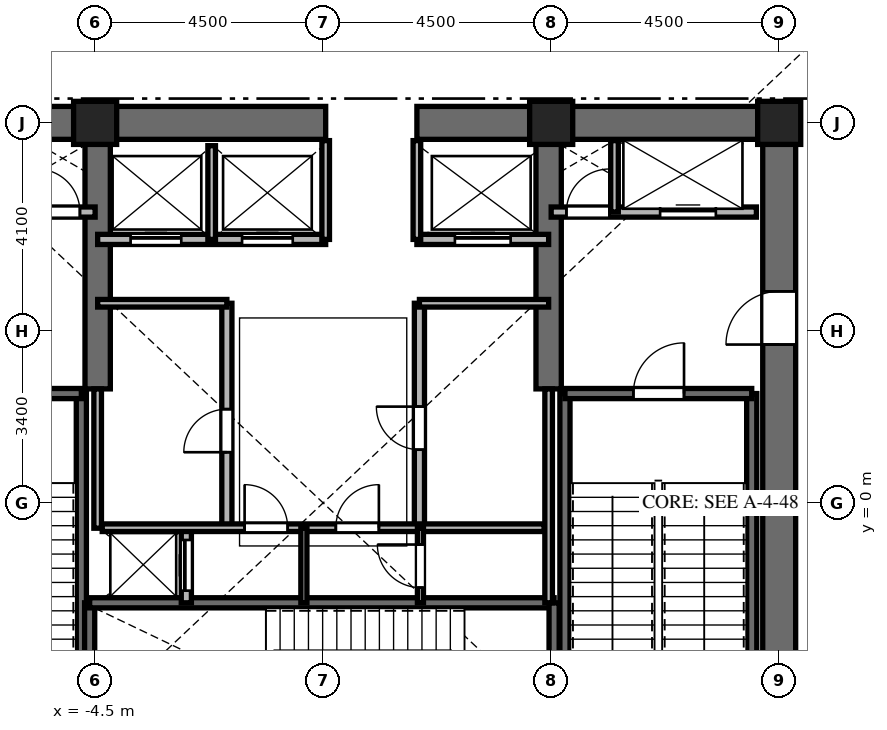
"""IFC4 building model, lengths in metres.
Left out: names, types, materials, properties, quantities, classifications, styles, units other than length and angle.
Written with IfcOpenShell. Run it as: python <this file> out.ifc"""

import sys

from ifc_helpers import new_model, si_unit, direction, frame, frame_2d, origin, origin_2d, place, context, subcontext, project, spatial, rectangle, extrude, element, fill, save


model = new_model("IFC4")
c1 = context("Model", 3, precision=1e-05, world=origin(), true_north=direction((0.0, 1.0)))
c2 = subcontext(c1, "Body", "Model", "MODEL_VIEW")
j1 = project(units=[si_unit("LENGTHUNIT", "METRE"), si_unit("PLANEANGLEUNIT", "RADIAN")], contexts=[c1])
p1 = place(None, origin())
s1 = spatial("IfcSite", under=j1, at=p1, CompositionType="ELEMENT")
p2 = place(p1, origin())
s2 = spatial("IfcBuilding", under=s1, at=p2, CompositionType="ELEMENT")
p3 = place(p2, frame((0.0, 0.0, 305.4)))
s3 = spatial("IfcBuildingStorey", under=s2, at=p3, CompositionType="ELEMENT", Elevation=305.4)
p4 = place(p3, frame((-9.325, 7.5, 0.0), z_axis=(0.0, 0.0, 1.0), x_axis=(1.0, 0.0, 0.0)))
e1 = element("IfcWall", 1, at=p4, inside=s3, PredefinedType="SHEAR", context=c2, shape_type="SweptSolid", body=[
    extrude(rectangle(XDim=9.375, YDim=0.65, at=frame_2d((4.688, 0.0))), origin(), (0.0, 0.0, 1.0), 5.0),
])
p5 = place(p3, frame((1.85, 7.5, 0.0), z_axis=(0.0, 0.0, 1.0), x_axis=(1.0, 0.0, 0.0)))
e2 = element("IfcWall", 2, at=p5, inside=s3, PredefinedType="SHEAR", context=c2, shape_type="SweptSolid", body=[
    extrude(rectangle(XDim=7.475, YDim=0.65, at=frame_2d((3.737, 0.0))), origin(), (0.0, 0.0, 1.0), 5.0),
])
p6 = place(p3, frame((9.0, -7.175, 0.0), z_axis=(0.0, 0.0, 1.0), x_axis=(0.0, 1.0, 0.0)))
e3 = element("IfcWall", 3, at=p6, inside=s3, PredefinedType="SHEAR", context=c2, shape_type="SweptSolid", body=[
    extrude(rectangle(XDim=14.35, YDim=0.65, at=frame_2d((7.175, 0.0))), origin(), (0.0, 0.0, 1.0), 5.0),
])
p7 = place(p6, frame((10.3, 0.0, 0.0)))
e4 = element("IfcOpeningElement", 4, at=p7, cuts=e3, PredefinedType="OPENING", context=c2, shape_type="SweptSolid", body=[
    extrude(rectangle(XDim=1.05, YDim=2.15, at=frame_2d((0.525, 1.075))), frame((0.0, 0.335, 0.0), z_axis=(0.0, -1.0, 0.0), x_axis=(1.0, 0.0, 0.0)), (0.0, 0.0, 1.0), 0.67),
])
for number, where, z_axis, x_axis in (
    (5, (-4.45, 2.25, 0.0), (0.0, 0.0, 1.0), (0.0, 1.0, 0.0)),
    (6, (4.45, 2.25, 0.0), (0.0, 0.0, 1.0), (0.0, 1.0, 0.0)),
):
    element("IfcWall", number, at=place(p3, frame(where, z_axis=z_axis, x_axis=x_axis)), inside=s3, PredefinedType="SHEAR", context=c2, shape_type="SweptSolid", body=[
        extrude(rectangle(XDim=4.925, YDim=0.5, at=frame_2d((2.462, 0.0))), origin(), (0.0, 0.0, 1.0), 5.0),
    ])
p8 = place(p3, frame((-4.772, -6.985, 0.0), z_axis=(0.0, 0.0, 1.0), x_axis=(0.0, 1.0, 0.0)))
e7 = element("IfcWall", 7, at=p8, inside=s3, PredefinedType="SHEAR", context=c2, shape_type="SweptSolid", body=[
    extrude(rectangle(XDim=9.143, YDim=0.2, at=frame_2d((4.572, 0.0))), origin(), (0.0, 0.0, 1.0), 5.0),
])
p9 = place(p3, frame((-8.458, 2.158, 0.0), z_axis=(0.0, 0.0, 1.0), x_axis=(1.0, 0.0, 0.0)))
e8 = element("IfcWall", 8, at=p9, inside=s3, PredefinedType="SHEAR", context=c2, shape_type="SweptSolid", body=[
    extrude(rectangle(XDim=3.686, YDim=0.2, at=frame_2d((1.843, 0.0))), origin(), (0.0, 0.0, 1.0), 5.0),
])
p10 = place(p9, frame((1.3, 0.0, 0.0)))
e9 = element("IfcOpeningElement", 9, at=p10, cuts=e8, PredefinedType="OPENING", context=c2, shape_type="SweptSolid", body=[
    extrude(rectangle(XDim=1.0, YDim=2.15, at=frame_2d((0.5, 1.075))), frame((0.0, 0.11, 0.0), z_axis=(0.0, -1.0, 0.0), x_axis=(1.0, 0.0, 0.0)), (0.0, 0.0, 1.0), 0.22),
])
for number, where, z_axis, x_axis in (
    (10, (4.772, -6.985, 0.0), (0.0, 0.0, 1.0), (0.0, 1.0, 0.0)),
    (11, (8.458, -6.985, 0.0), (0.0, 0.0, 1.0), (0.0, 1.0, 0.0)),
):
    element("IfcWall", number, at=place(p3, frame(where, z_axis=z_axis, x_axis=x_axis)), inside=s3, PredefinedType="SHEAR", context=c2, shape_type="SweptSolid", body=[
        extrude(rectangle(XDim=9.143, YDim=0.2, at=frame_2d((4.572, 0.0))), origin(), (0.0, 0.0, 1.0), 5.0),
    ])
p11 = place(p3, frame((4.772, 2.158, 0.0), z_axis=(0.0, 0.0, 1.0), x_axis=(1.0, 0.0, 0.0)))
e12 = element("IfcWall", 12, at=p11, inside=s3, PredefinedType="SHEAR", context=c2, shape_type="SweptSolid", body=[
    extrude(rectangle(XDim=3.686, YDim=0.2, at=frame_2d((1.843, 0.0))), origin(), (0.0, 0.0, 1.0), 5.0),
])
p12 = place(p11, frame((1.35, 0.0, 0.0)))
e13 = element("IfcOpeningElement", 13, at=p12, cuts=e12, PredefinedType="OPENING", context=c2, shape_type="SweptSolid", body=[
    extrude(rectangle(XDim=1.0, YDim=2.15, at=frame_2d((0.5, 1.075))), frame((0.0, 0.11, 0.0), z_axis=(0.0, -1.0, 0.0), x_axis=(1.0, 0.0, 0.0)), (0.0, 0.0, 1.0), 0.22),
])
p13 = place(p3, frame((-4.608, -5.658, 0.0), z_axis=(0.0, 0.0, 1.0), x_axis=(0.0, 1.0, 0.0)))
e14 = element("IfcWall", 14, at=p13, inside=s3, PredefinedType="SHEAR", context=c2, shape_type="SweptSolid", body=[
    extrude(rectangle(XDim=3.686, YDim=0.2, at=frame_2d((1.843, 0.0))), origin(), (0.0, 0.0, 1.0), 5.0),
])
p14 = place(p3, frame((-4.608, -1.972, 0.0), z_axis=(0.0, 0.0, 1.0), x_axis=(1.0, 0.0, 0.0)))
e15 = element("IfcWall", 15, at=p14, inside=s3, PredefinedType="SHEAR", context=c2, shape_type="SweptSolid", body=[
    extrude(rectangle(XDim=9.166, YDim=0.2, at=frame_2d((4.583, 0.0))), origin(), (0.0, 0.0, 1.0), 5.0),
])
p15 = place(p3, frame((4.558, -5.658, 0.0), z_axis=(0.0, 0.0, 1.0), x_axis=(0.0, 1.0, 0.0)))
e16 = element("IfcWall", 16, at=p15, inside=s3, PredefinedType="SHEAR", context=c2, shape_type="SweptSolid", body=[
    extrude(rectangle(XDim=3.686, YDim=0.2, at=frame_2d((1.843, 0.0))), origin(), (0.0, 0.0, 1.0), 5.0),
])
for number, where, z_axis, x_axis in (
    (17, (9.0, 7.5, 0.0), (0.0, 0.0, 1.0), (1.0, 0.0, 0.0)),
    (18, (4.5, 7.5, 0.0), (0.0, 0.0, 1.0), (1.0, 0.0, 0.0)),
    (19, (-4.5, 7.5, 0.0), (0.0, 0.0, 1.0), (1.0, 0.0, 0.0)),
):
    element("IfcColumn", number, at=place(p3, frame(where, z_axis=z_axis, x_axis=x_axis)), inside=s3, PredefinedType="COLUMN", context=c2, shape_type="SweptSolid", body=[
        extrude(rectangle(XDim=0.85, YDim=0.85, at=origin_2d()), origin(), (0.0, 0.0, 1.0), 5.0),
    ])
p16 = place(p3, frame((-8.55, 5.74, 0.0), z_axis=(0.0, 0.0, 1.0), x_axis=(1.0, 0.0, 0.0)))
e20 = element("IfcWall", 20, at=p16, inside=s3, PredefinedType="PARTITIONING", context=c2, shape_type="SweptSolid", body=[
    extrude(rectangle(XDim=4.05, YDim=0.2, at=frame_2d((2.025, 0.0))), origin(), (0.0, 0.0, 1.0), 4.68),
])
p17 = place(p16, frame((0.75, 0.0, 0.0)))
e21 = element("IfcOpeningElement", 21, at=p17, cuts=e20, PredefinedType="OPENING", context=c2, shape_type="SweptSolid", body=[
    extrude(rectangle(XDim=1.1, YDim=2.2, at=frame_2d((0.55, 1.1))), frame((0.0, 0.11, 0.0), z_axis=(0.0, -1.0, 0.0), x_axis=(1.0, 0.0, 0.0)), (0.0, 0.0, 1.0), 0.22),
])
p18 = place(p16, frame((2.9, 0.0, 0.0)))
e22 = element("IfcOpeningElement", 22, at=p18, cuts=e20, PredefinedType="OPENING", context=c2, shape_type="SweptSolid", body=[
    extrude(rectangle(XDim=0.85, YDim=2.03, at=frame_2d((0.425, 1.015))), frame((0.0, 0.11, 0.0), z_axis=(0.0, -1.0, 0.0), x_axis=(1.0, 0.0, 0.0)), (0.0, 0.0, 1.0), 0.22),
])
p19 = place(p3, frame((4.5, 5.74, 0.0), z_axis=(0.0, 0.0, 1.0), x_axis=(1.0, 0.0, 0.0)))
e23 = element("IfcWall", 23, at=p19, inside=s3, PredefinedType="PARTITIONING", context=c2, shape_type="SweptSolid", body=[
    extrude(rectangle(XDim=4.05, YDim=0.2, at=frame_2d((2.025, 0.0))), origin(), (0.0, 0.0, 1.0), 4.68),
])
p20 = place(p19, frame((0.3, 0.0, 0.0)))
e24 = element("IfcOpeningElement", 24, at=p20, cuts=e23, PredefinedType="OPENING", context=c2, shape_type="SweptSolid", body=[
    extrude(rectangle(XDim=0.85, YDim=2.03, at=frame_2d((0.425, 1.015))), frame((0.0, 0.11, 0.0), z_axis=(0.0, -1.0, 0.0), x_axis=(1.0, 0.0, 0.0)), (0.0, 0.0, 1.0), 0.22),
])
p21 = place(p19, frame((2.15, 0.0, 0.0)))
e25 = element("IfcOpeningElement", 25, at=p21, cuts=e23, PredefinedType="OPENING", context=c2, shape_type="SweptSolid", body=[
    extrude(rectangle(XDim=1.1, YDim=2.2, at=frame_2d((0.55, 1.1))), frame((0.0, 0.11, 0.0), z_axis=(0.0, -1.0, 0.0), x_axis=(1.0, 0.0, 0.0)), (0.0, 0.0, 1.0), 0.22),
])
p22 = place(p3, frame((5.75, 5.74, 0.0), z_axis=(0.0, 0.0, 1.0), x_axis=(0.0, 1.0, 0.0)))
e26 = element("IfcWall", 26, at=p22, inside=s3, PredefinedType="PARTITIONING", context=c2, shape_type="SweptSolid", body=[
    extrude(rectangle(XDim=1.41, YDim=0.15, at=frame_2d((0.705, 0.0))), origin(), (0.0, 0.0, 1.0), 4.68),
])
p23 = place(p3, frame((-2.7, -1.972, 0.0), z_axis=(0.0, 0.0, 1.0), x_axis=(0.0, 1.0, 0.0)))
e27 = element("IfcWall", 27, at=p23, inside=s3, PredefinedType="PARTITIONING", context=c2, shape_type="SweptSolid", body=[
    extrude(rectangle(XDim=1.472, YDim=0.2, at=frame_2d((0.736, 0.0))), origin(), (0.0, 0.0, 1.0), 4.68),
])
p24 = place(p23, frame((0.24, 0.0, 0.0)))
e28 = element("IfcOpeningElement", 28, at=p24, cuts=e27, PredefinedType="OPENING", context=c2, shape_type="SweptSolid", body=[
    extrude(rectangle(XDim=1.0, YDim=2.2, at=frame_2d((0.5, 1.1))), frame((0.0, 0.11, 0.0), z_axis=(0.0, -1.0, 0.0), x_axis=(1.0, 0.0, 0.0)), (0.0, 0.0, 1.0), 0.22),
])
p25 = place(p3, frame((-4.45, 5.2, 0.0), z_axis=(0.0, 0.0, 1.0), x_axis=(1.0, 0.0, 0.0)))
e29 = element("IfcWall", 29, at=p25, inside=s3, PredefinedType="PARTITIONING", context=c2, shape_type="SweptSolid", body=[
    extrude(rectangle(XDim=4.5, YDim=0.2, at=frame_2d((2.25, 0.0))), origin(), (0.0, 0.0, 1.0), 4.68),
])
p26 = place(p25, frame((0.65, 0.0, 0.0)))
e30 = element("IfcOpeningElement", 30, at=p26, cuts=e29, PredefinedType="OPENING", context=c2, shape_type="SweptSolid", body=[
    extrude(rectangle(XDim=1.0, YDim=2.2, at=frame_2d((0.5, 1.1))), frame((0.0, 0.11, 0.0), z_axis=(0.0, -1.0, 0.0), x_axis=(1.0, 0.0, 0.0)), (0.0, 0.0, 1.0), 0.22),
])
p27 = place(p25, frame((2.85, 0.0, 0.0)))
e31 = element("IfcOpeningElement", 31, at=p27, cuts=e29, PredefinedType="OPENING", context=c2, shape_type="SweptSolid", body=[
    extrude(rectangle(XDim=1.0, YDim=2.2, at=frame_2d((0.5, 1.1))), frame((0.0, 0.11, 0.0), z_axis=(0.0, -1.0, 0.0), x_axis=(1.0, 0.0, 0.0)), (0.0, 0.0, 1.0), 0.22),
])
p28 = place(p3, frame((1.85, 5.2, 0.0), z_axis=(0.0, 0.0, 1.0), x_axis=(1.0, 0.0, 0.0)))
e32 = element("IfcWall", 32, at=p28, inside=s3, PredefinedType="PARTITIONING", context=c2, shape_type="SweptSolid", body=[
    extrude(rectangle(XDim=2.6, YDim=0.2, at=frame_2d((1.3, 0.0))), origin(), (0.0, 0.0, 1.0), 4.68),
])
p29 = place(p28, frame((0.75, 0.0, 0.0)))
e33 = element("IfcOpeningElement", 33, at=p29, cuts=e32, PredefinedType="OPENING", context=c2, shape_type="SweptSolid", body=[
    extrude(rectangle(XDim=1.1, YDim=2.2, at=frame_2d((0.55, 1.1))), frame((0.0, 0.11, 0.0), z_axis=(0.0, -1.0, 0.0), x_axis=(1.0, 0.0, 0.0)), (0.0, 0.0, 1.0), 0.22),
])
p30 = place(p3, frame((-2.2, 5.2, 0.0), z_axis=(0.0, 0.0, 1.0), x_axis=(0.0, 1.0, 0.0)))
e34 = element("IfcWall", 34, at=p30, inside=s3, PredefinedType="PARTITIONING", context=c2, shape_type="SweptSolid", body=[
    extrude(rectangle(XDim=1.85, YDim=0.15, at=frame_2d((0.925, 0.0))), origin(), (0.0, 0.0, 1.0), 4.68),
])
for number, where, z_axis, x_axis in (
    (35, (0.05, 5.2, 0.0), (0.0, 0.0, 1.0), (0.0, 1.0, 0.0)),
    (36, (1.85, 5.2, 0.0), (0.0, 0.0, 1.0), (0.0, 1.0, 0.0)),
):
    element("IfcWall", number, at=place(p3, frame(where, z_axis=z_axis, x_axis=x_axis)), inside=s3, PredefinedType="PARTITIONING", context=c2, shape_type="SweptSolid", body=[
        extrude(rectangle(XDim=1.95, YDim=0.15, at=frame_2d((0.975, 0.0))), origin(), (0.0, 0.0, 1.0), 4.68),
    ])
p31 = place(p3, frame((-4.45, -0.5, 0.0), z_axis=(0.0, 0.0, 1.0), x_axis=(0.0, 1.0, 0.0)))
e37 = element("IfcWall", 37, at=p31, inside=s3, PredefinedType="PARTITIONING", context=c2, shape_type="SweptSolid", body=[
    extrude(rectangle(XDim=2.75, YDim=0.15, at=frame_2d((1.375, 0.0))), origin(), (0.0, 0.0, 1.0), 4.68),
])
p32 = place(p3, frame((4.45, -1.972, 0.0), z_axis=(0.0, 0.0, 1.0), x_axis=(0.0, 1.0, 0.0)))
e38 = element("IfcWall", 38, at=p32, inside=s3, PredefinedType="PARTITIONING", context=c2, shape_type="SweptSolid", body=[
    extrude(rectangle(XDim=4.222, YDim=0.15, at=frame_2d((2.111, 0.0))), origin(), (0.0, 0.0, 1.0), 4.68),
])
p33 = place(p3, frame((-1.9, -0.5, 0.0), z_axis=(0.0, 0.0, 1.0), x_axis=(0.0, 1.0, 0.0)))
e39 = element("IfcWall", 39, at=p33, inside=s3, PredefinedType="PARTITIONING", context=c2, shape_type="SweptSolid", body=[
    extrude(rectangle(XDim=4.44, YDim=0.2, at=frame_2d((2.22, 0.0))), origin(), (0.0, 0.0, 1.0), 4.68),
])
p34 = place(p33, frame((1.5, 0.0, 0.0)))
e40 = element("IfcOpeningElement", 40, at=p34, cuts=e39, PredefinedType="OPENING", context=c2, shape_type="SweptSolid", body=[
    extrude(rectangle(XDim=0.85, YDim=2.03, at=frame_2d((0.425, 1.015))), frame((0.0, 0.11, 0.0), z_axis=(0.0, -1.0, 0.0), x_axis=(1.0, 0.0, 0.0)), (0.0, 0.0, 1.0), 0.22),
])
p35 = place(p3, frame((-4.45, 3.94, 0.0), z_axis=(0.0, 0.0, 1.0), x_axis=(1.0, 0.0, 0.0)))
e41 = element("IfcWall", 41, at=p35, inside=s3, PredefinedType="PARTITIONING", context=c2, shape_type="SweptSolid", body=[
    extrude(rectangle(XDim=2.55, YDim=0.15, at=frame_2d((1.275, 0.0))), origin(), (0.0, 0.0, 1.0), 4.68),
])
p36 = place(p3, frame((1.9, -0.5, 0.0), z_axis=(0.0, 0.0, 1.0), x_axis=(0.0, 1.0, 0.0)))
e42 = element("IfcWall", 42, at=p36, inside=s3, PredefinedType="PARTITIONING", context=c2, shape_type="SweptSolid", body=[
    extrude(rectangle(XDim=4.44, YDim=0.2, at=frame_2d((2.22, 0.0))), origin(), (0.0, 0.0, 1.0), 4.68),
])
p37 = place(p36, frame((1.55, 0.0, 0.0)))
e43 = element("IfcOpeningElement", 43, at=p37, cuts=e42, PredefinedType="OPENING", context=c2, shape_type="SweptSolid", body=[
    extrude(rectangle(XDim=0.85, YDim=2.03, at=frame_2d((0.425, 1.015))), frame((0.0, 0.11, 0.0), z_axis=(0.0, -1.0, 0.0), x_axis=(1.0, 0.0, 0.0)), (0.0, 0.0, 1.0), 0.22),
])
p38 = place(p3, frame((1.9, 3.94, 0.0), z_axis=(0.0, 0.0, 1.0), x_axis=(1.0, 0.0, 0.0)))
e44 = element("IfcWall", 44, at=p38, inside=s3, PredefinedType="PARTITIONING", context=c2, shape_type="SweptSolid", body=[
    extrude(rectangle(XDim=2.55, YDim=0.15, at=frame_2d((1.275, 0.0))), origin(), (0.0, 0.0, 1.0), 4.68),
])
p39 = place(p3, frame((-4.36, -0.49, 0.0), z_axis=(0.0, 0.0, 1.0), x_axis=(1.0, 0.0, 0.0)))
e45 = element("IfcWall", 45, at=p39, inside=s3, PredefinedType="PARTITIONING", context=c2, shape_type="SweptSolid", body=[
    extrude(rectangle(XDim=8.72, YDim=0.15, at=frame_2d((4.36, 0.0))), origin(), (0.0, 0.0, 1.0), 4.68),
])
p40 = place(p39, frame((2.81, 0.0, 0.0)))
e46 = element("IfcOpeningElement", 46, at=p40, cuts=e45, PredefinedType="OPENING", context=c2, shape_type="SweptSolid", body=[
    extrude(rectangle(XDim=0.85, YDim=2.03, at=frame_2d((0.425, 1.015))), frame((0.0, 0.085, 0.0), z_axis=(0.0, -1.0, 0.0), x_axis=(1.0, 0.0, 0.0)), (0.0, 0.0, 1.0), 0.17),
])
p41 = place(p39, frame((4.61, 0.0, 0.0)))
e47 = element("IfcOpeningElement", 47, at=p41, cuts=e45, PredefinedType="OPENING", context=c2, shape_type="SweptSolid", body=[
    extrude(rectangle(XDim=0.85, YDim=2.03, at=frame_2d((0.425, 1.015))), frame((0.0, 0.085, 0.0), z_axis=(0.0, -1.0, 0.0), x_axis=(1.0, 0.0, 0.0)), (0.0, 0.0, 1.0), 0.17),
])
p42 = place(p3, frame((-0.38, -1.972, 0.0), z_axis=(0.0, 0.0, 1.0), x_axis=(0.0, 1.0, 0.0)))
e48 = element("IfcWall", 48, at=p42, inside=s3, PredefinedType="PARTITIONING", context=c2, shape_type="SweptSolid", body=[
    extrude(rectangle(XDim=1.472, YDim=0.12, at=frame_2d((0.736, 0.0))), origin(), (0.0, 0.0, 1.0), 4.68),
])
p43 = place(p3, frame((1.92, -1.972, 0.0), z_axis=(0.0, 0.0, 1.0), x_axis=(0.0, 1.0, 0.0)))
e49 = element("IfcWall", 49, at=p43, inside=s3, PredefinedType="PARTITIONING", context=c2, shape_type="SweptSolid", body=[
    extrude(rectangle(XDim=1.472, YDim=0.12, at=frame_2d((0.736, 0.0))), origin(), (0.0, 0.0, 1.0), 4.68),
])
p44 = place(p43, frame((0.3, 0.0, 0.0)))
e50 = element("IfcOpeningElement", 50, at=p44, cuts=e49, PredefinedType="OPENING", context=c2, shape_type="SweptSolid", body=[
    extrude(rectangle(XDim=0.85, YDim=2.03, at=frame_2d((0.425, 1.015))), frame((0.0, 0.07, 0.0), z_axis=(0.0, -1.0, 0.0), x_axis=(1.0, 0.0, 0.0)), (0.0, 0.0, 1.0), 0.14),
])
p45 = place(p12, origin())
e51 = element("IfcDoor", 51, at=p45, inside=s3, OperationType="SINGLE_SWING_RIGHT", PredefinedType="DOOR", context=c2, shape_type="SweptSolid", body=[
    extrude(rectangle(XDim=1.0, YDim=2.15, at=frame_2d((0.5, 1.075))), frame((0.0, 0.025, 0.0), z_axis=(0.0, -1.0, 0.0), x_axis=(1.0, 0.0, 0.0)), (0.0, 0.0, 1.0), 0.05),
])
fill(e13, e51)
p46 = place(p7, origin())
e52 = element("IfcDoor", 52, at=p46, inside=s3, OperationType="SINGLE_SWING_LEFT", PredefinedType="DOOR", context=c2, shape_type="SweptSolid", body=[
    extrude(rectangle(XDim=1.05, YDim=2.15, at=frame_2d((0.525, 1.075))), frame((0.0, 0.025, 0.0), z_axis=(0.0, -1.0, 0.0), x_axis=(1.0, 0.0, 0.0)), (0.0, 0.0, 1.0), 0.05),
])
fill(e4, e52)
p47 = place(p18, origin())
e53 = element("IfcDoor", 53, at=p47, inside=s3, OperationType="SINGLE_SWING_LEFT", PredefinedType="DOOR", context=c2, shape_type="SweptSolid", body=[
    extrude(rectangle(XDim=0.85, YDim=2.03, at=frame_2d((0.425, 1.015))), frame((0.0, 0.025, 0.0), z_axis=(0.0, -1.0, 0.0), x_axis=(1.0, 0.0, 0.0)), (0.0, 0.0, 1.0), 0.05),
])
fill(e22, e53)
p48 = place(p20, origin())
e54 = element("IfcDoor", 54, at=p48, inside=s3, OperationType="SINGLE_SWING_RIGHT", PredefinedType="DOOR", context=c2, shape_type="SweptSolid", body=[
    extrude(rectangle(XDim=0.85, YDim=2.03, at=frame_2d((0.425, 1.015))), frame((0.0, 0.025, 0.0), z_axis=(0.0, -1.0, 0.0), x_axis=(1.0, 0.0, 0.0)), (0.0, 0.0, 1.0), 0.05),
])
fill(e24, e54)
p49 = place(p21, origin())
e55 = element("IfcDoor", 55, at=p49, inside=s3, OperationType="SLIDING_TO_RIGHT", PredefinedType="DOOR", context=c2, shape_type="SweptSolid", body=[
    extrude(rectangle(XDim=1.1, YDim=2.2, at=frame_2d((0.55, 1.1))), frame((0.0, 0.025, 0.0), z_axis=(0.0, -1.0, 0.0), x_axis=(1.0, 0.0, 0.0)), (0.0, 0.0, 1.0), 0.05),
])
fill(e25, e55)
p50 = place(p24, origin())
e56 = element("IfcDoor", 56, at=p50, inside=s3, OperationType="SLIDING_TO_LEFT", PredefinedType="DOOR", context=c2, shape_type="SweptSolid", body=[
    extrude(rectangle(XDim=1.0, YDim=2.2, at=frame_2d((0.5, 1.1))), frame((0.0, 0.025, 0.0), z_axis=(0.0, -1.0, 0.0), x_axis=(1.0, 0.0, 0.0)), (0.0, 0.0, 1.0), 0.05),
])
fill(e28, e56)
p51 = place(p26, origin())
e57 = element("IfcDoor", 57, at=p51, inside=s3, OperationType="SLIDING_TO_LEFT", PredefinedType="DOOR", context=c2, shape_type="SweptSolid", body=[
    extrude(rectangle(XDim=1.0, YDim=2.2, at=frame_2d((0.5, 1.1))), frame((0.0, 0.025, 0.0), z_axis=(0.0, -1.0, 0.0), x_axis=(1.0, 0.0, 0.0)), (0.0, 0.0, 1.0), 0.05),
])
fill(e30, e57)
p52 = place(p27, origin())
e58 = element("IfcDoor", 58, at=p52, inside=s3, OperationType="SLIDING_TO_RIGHT", PredefinedType="DOOR", context=c2, shape_type="SweptSolid", body=[
    extrude(rectangle(XDim=1.0, YDim=2.2, at=frame_2d((0.5, 1.1))), frame((0.0, 0.025, 0.0), z_axis=(0.0, -1.0, 0.0), x_axis=(1.0, 0.0, 0.0)), (0.0, 0.0, 1.0), 0.05),
])
fill(e31, e58)
p53 = place(p29, origin())
e59 = element("IfcDoor", 59, at=p53, inside=s3, OperationType="SLIDING_TO_RIGHT", PredefinedType="DOOR", context=c2, shape_type="SweptSolid", body=[
    extrude(rectangle(XDim=1.1, YDim=2.2, at=frame_2d((0.55, 1.1))), frame((0.0, 0.025, 0.0), z_axis=(0.0, -1.0, 0.0), x_axis=(1.0, 0.0, 0.0)), (0.0, 0.0, 1.0), 0.05),
])
fill(e33, e59)
p54 = place(p34, origin())
e60 = element("IfcDoor", 60, at=p54, inside=s3, OperationType="SINGLE_SWING_LEFT", PredefinedType="DOOR", context=c2, shape_type="SweptSolid", body=[
    extrude(rectangle(XDim=0.85, YDim=2.03, at=frame_2d((0.425, 1.015))), frame((0.0, 0.025, 0.0), z_axis=(0.0, -1.0, 0.0), x_axis=(1.0, 0.0, 0.0)), (0.0, 0.0, 1.0), 0.05),
])
fill(e40, e60)
p55 = place(p37, origin())
e61 = element("IfcDoor", 61, at=p55, inside=s3, OperationType="SINGLE_SWING_RIGHT", PredefinedType="DOOR", context=c2, shape_type="SweptSolid", body=[
    extrude(rectangle(XDim=0.85, YDim=2.03, at=frame_2d((0.425, 1.015))), frame((0.0, 0.025, 0.0), z_axis=(0.0, -1.0, 0.0), x_axis=(1.0, 0.0, 0.0)), (0.0, 0.0, 1.0), 0.05),
])
fill(e43, e61)
p56 = place(p40, origin())
e62 = element("IfcDoor", 62, at=p56, inside=s3, OperationType="SINGLE_SWING_LEFT", PredefinedType="DOOR", context=c2, shape_type="SweptSolid", body=[
    extrude(rectangle(XDim=0.85, YDim=2.03, at=frame_2d((0.425, 1.015))), frame((0.0, 0.025, 0.0), z_axis=(0.0, -1.0, 0.0), x_axis=(1.0, 0.0, 0.0)), (0.0, 0.0, 1.0), 0.05),
])
fill(e46, e62)
p57 = place(p41, origin())
e63 = element("IfcDoor", 63, at=p57, inside=s3, OperationType="SINGLE_SWING_RIGHT", PredefinedType="DOOR", context=c2, shape_type="SweptSolid", body=[
    extrude(rectangle(XDim=0.85, YDim=2.03, at=frame_2d((0.425, 1.015))), frame((0.0, 0.025, 0.0), z_axis=(0.0, -1.0, 0.0), x_axis=(1.0, 0.0, 0.0)), (0.0, 0.0, 1.0), 0.05),
])
fill(e47, e63)
p58 = place(p44, origin())
e64 = element("IfcDoor", 64, at=p58, inside=s3, OperationType="SINGLE_SWING_RIGHT", PredefinedType="DOOR", context=c2, shape_type="SweptSolid", body=[
    extrude(rectangle(XDim=0.85, YDim=2.03, at=frame_2d((0.425, 1.015))), frame((0.0, 0.025, 0.0), z_axis=(0.0, -1.0, 0.0), x_axis=(1.0, 0.0, 0.0)), (0.0, 0.0, 1.0), 0.05),
])
fill(e50, e64)
save(model, sys.argv[1])
